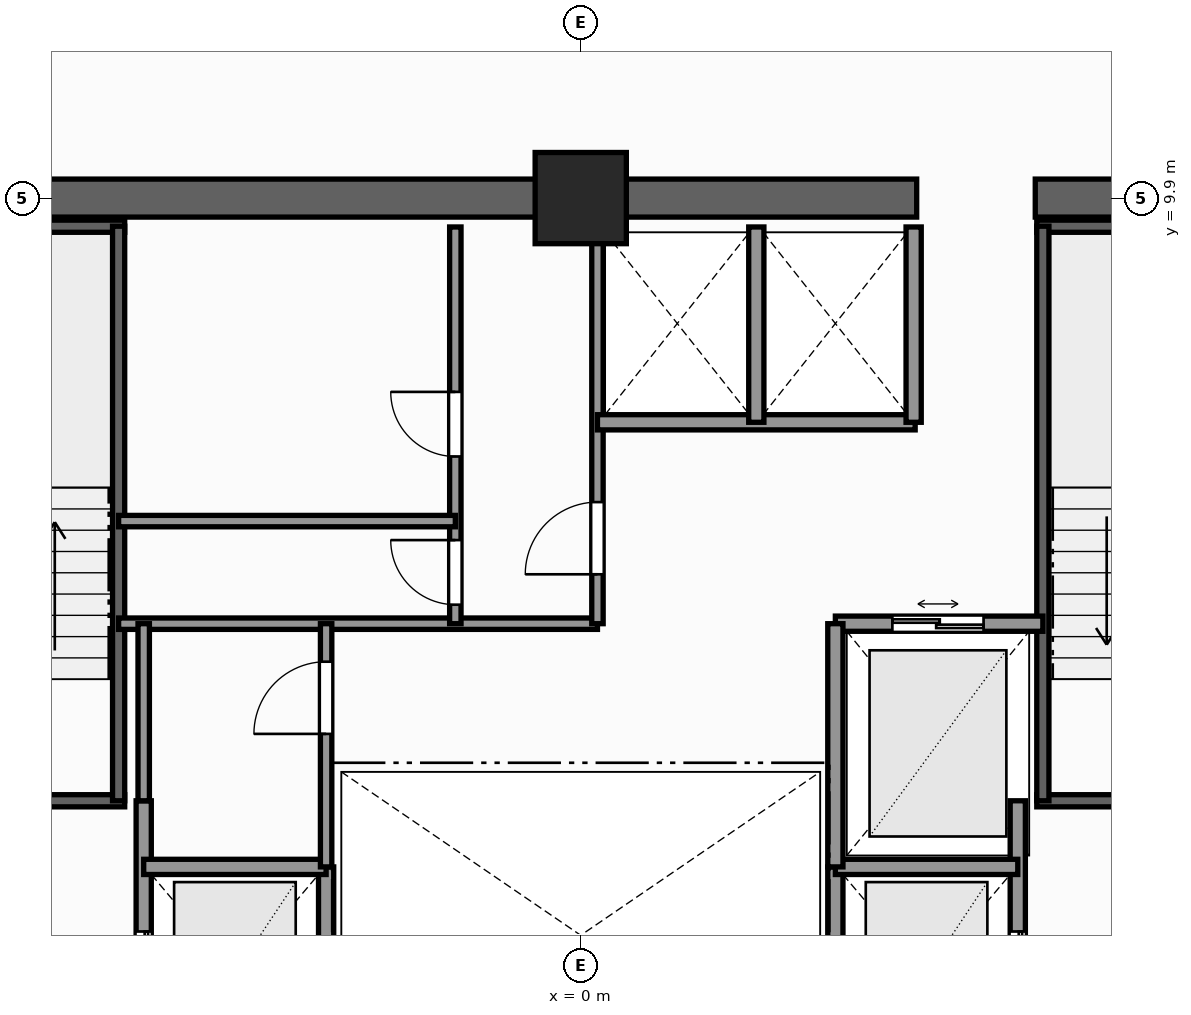
"""IFC4 building model, lengths in metres.
Left out: names, types, materials, properties, quantities, classifications, styles, units other than length and angle.
Written with IfcOpenShell. Run it as: python <this file> out.ifc"""

import sys

from ifc_helpers import new_model, si_unit, direction, frame, frame_2d, origin, origin_2d, place, context, subcontext, project, spatial, rectangle, extrude, element, fill, save


model = new_model("IFC4")
c1 = context("Model", 3, precision=1e-05, world=origin(), true_north=direction((0.0, 1.0)))
c2 = subcontext(c1, "Body", "Model", "MODEL_VIEW")
j1 = project(units=[si_unit("LENGTHUNIT", "METRE"), si_unit("PLANEANGLEUNIT", "RADIAN")], contexts=[c1])
p1 = place(None, origin())
s1 = spatial("IfcSite", under=j1, at=p1, CompositionType="ELEMENT")
p2 = place(p1, origin())
s2 = spatial("IfcBuilding", under=s1, at=p2, CompositionType="ELEMENT")
p3 = place(p2, frame((0.0, 0.0, 138.2)))
s3 = spatial("IfcBuildingStorey", under=s2, at=p3, CompositionType="ELEMENT", Elevation=138.2)
p4 = place(p3, frame((-10.15, 9.9, 0.0), z_axis=(0.0, 0.0, 1.0), x_axis=(1.0, 0.0, 0.0)))
e1 = element("IfcWall", 1, at=p4, inside=s3, PredefinedType="SHEAR", context=c2, shape_type="SweptSolid", body=[
    extrude(rectangle(XDim=14.57, YDim=0.5, at=frame_2d((7.285, 0.0))), origin(), (0.0, 0.0, 1.0), 3.3),
])
p5 = place(p3, frame((5.98, 9.9, 0.0), z_axis=(0.0, 0.0, 1.0), x_axis=(1.0, 0.0, 0.0)))
e2 = element("IfcWall", 2, at=p5, inside=s3, PredefinedType="SHEAR", context=c2, shape_type="SweptSolid", body=[
    extrude(rectangle(XDim=4.17, YDim=0.5, at=frame_2d((2.085, 0.0))), origin(), (0.0, 0.0, 1.0), 3.3),
])
p6 = place(p3, frame((0.0, 9.9, 0.0), z_axis=(0.0, 0.0, 1.0), x_axis=(1.0, 0.0, 0.0)))
e3 = element("IfcColumn", 3, at=p6, inside=s3, PredefinedType="COLUMN", context=c2, shape_type="SweptSolid", body=[
    extrude(rectangle(XDim=1.2, YDim=1.2, at=origin_2d()), origin(), (0.0, 0.0, 1.0), 3.3),
])
p7 = place(p3, frame((-9.52, 1.97, 0.0), z_axis=(0.0, 0.0, 1.0), x_axis=(1.0, 0.0, 0.0)))
e4 = element("IfcWall", 4, at=p7, inside=s3, PredefinedType="SHEAR", context=c2, shape_type="SweptSolid", body=[
    extrude(rectangle(XDim=3.52, YDim=0.16, at=frame_2d((1.76, 0.0))), origin(), (0.0, 0.0, 1.0), 3.3),
])
p8 = place(p7, frame((1.15, 0.0, 0.0)))
e5 = element("IfcOpeningElement", 5, at=p8, cuts=e4, PredefinedType="OPENING", context=c2, shape_type="SweptSolid", body=[
    extrude(rectangle(XDim=1.1, YDim=2.2, at=frame_2d((0.55, 1.1))), frame((0.0, 0.09, 0.0), z_axis=(0.0, -1.0, 0.0), x_axis=(1.0, 0.0, 0.0)), (0.0, 0.0, 1.0), 0.18),
])
p9 = place(p3, frame((-9.52, 9.53, 0.0), z_axis=(0.0, 0.0, 1.0), x_axis=(1.0, 0.0, 0.0)))
e6 = element("IfcWall", 6, at=p9, inside=s3, PredefinedType="SHEAR", context=c2, shape_type="SweptSolid", body=[
    extrude(rectangle(XDim=3.52, YDim=0.16, at=frame_2d((1.76, 0.0))), origin(), (0.0, 0.0, 1.0), 3.3),
])
p10 = place(p3, frame((-6.08, 1.97, 0.0), z_axis=(0.0, 0.0, 1.0), x_axis=(0.0, 1.0, 0.0)))
e7 = element("IfcWall", 7, at=p10, inside=s3, PredefinedType="SHEAR", context=c2, shape_type="SweptSolid", body=[
    extrude(rectangle(XDim=7.56, YDim=0.16, at=frame_2d((3.78, 0.0))), origin(), (0.0, 0.0, 1.0), 3.3),
])
p11 = place(p3, frame((6.0, 1.97, 0.0), z_axis=(0.0, 0.0, 1.0), x_axis=(1.0, 0.0, 0.0)))
e8 = element("IfcWall", 8, at=p11, inside=s3, PredefinedType="SHEAR", context=c2, shape_type="SweptSolid", body=[
    extrude(rectangle(XDim=3.52, YDim=0.16, at=frame_2d((1.76, 0.0))), origin(), (0.0, 0.0, 1.0), 3.3),
])
p12 = place(p11, frame((1.15, 0.0, 0.0)))
e9 = element("IfcOpeningElement", 9, at=p12, cuts=e8, PredefinedType="OPENING", context=c2, shape_type="SweptSolid", body=[
    extrude(rectangle(XDim=1.1, YDim=2.2, at=frame_2d((0.55, 1.1))), frame((0.0, 0.09, 0.0), z_axis=(0.0, -1.0, 0.0), x_axis=(1.0, 0.0, 0.0)), (0.0, 0.0, 1.0), 0.18),
])
p13 = place(p3, frame((6.0, 9.53, 0.0), z_axis=(0.0, 0.0, 1.0), x_axis=(1.0, 0.0, 0.0)))
e10 = element("IfcWall", 10, at=p13, inside=s3, PredefinedType="SHEAR", context=c2, shape_type="SweptSolid", body=[
    extrude(rectangle(XDim=3.52, YDim=0.16, at=frame_2d((1.76, 0.0))), origin(), (0.0, 0.0, 1.0), 3.3),
])
p14 = place(p3, frame((6.08, 1.97, 0.0), z_axis=(0.0, 0.0, 1.0), x_axis=(0.0, 1.0, 0.0)))
e11 = element("IfcWall", 11, at=p14, inside=s3, PredefinedType="SHEAR", context=c2, shape_type="SweptSolid", body=[
    extrude(rectangle(XDim=7.56, YDim=0.16, at=frame_2d((3.78, 0.0))), origin(), (0.0, 0.0, 1.0), 3.3),
])
p15 = place(p3, frame((-5.75, -3.6, 0.0), z_axis=(0.0, 0.0, 1.0), x_axis=(0.0, 1.0, 0.0)))
e12 = element("IfcWall", 12, at=p15, inside=s3, PredefinedType="SOLIDWALL", context=c2, shape_type="SweptSolid", body=[
    extrude(rectangle(XDim=5.57, YDim=0.2, at=frame_2d((2.785, 0.0))), origin(), (0.0, 0.0, 1.0), 2.735),
])
p16 = place(p15, frame((2.75, 0.0, 0.0)))
e13 = element("IfcOpeningElement", 13, at=p16, cuts=e12, PredefinedType="OPENING", context=c2, shape_type="SweptSolid", body=[
    extrude(rectangle(XDim=1.1, YDim=2.2, at=frame_2d((0.55, 1.1))), frame((0.0, 0.11, 0.0), z_axis=(0.0, -1.0, 0.0), x_axis=(1.0, 0.0, 0.0)), (0.0, 0.0, 1.0), 0.22),
])
p17 = place(p3, frame((-3.35, -1.7, 0.0), z_axis=(0.0, 0.0, 1.0), x_axis=(0.0, 1.0, 0.0)))
e14 = element("IfcWall", 14, at=p17, inside=s3, PredefinedType="SOLIDWALL", context=c2, shape_type="SweptSolid", body=[
    extrude(rectangle(XDim=2.8, YDim=0.2, at=frame_2d((1.4, 0.0))), origin(), (0.0, 0.0, 1.0), 2.735),
])
p18 = place(p3, frame((-5.75, 1.1, 0.0), z_axis=(0.0, 0.0, 1.0), x_axis=(1.0, 0.0, 0.0)))
e15 = element("IfcWall", 15, at=p18, inside=s3, PredefinedType="SOLIDWALL", context=c2, shape_type="SweptSolid", body=[
    extrude(rectangle(XDim=2.4, YDim=0.2, at=frame_2d((1.2, 0.0))), origin(), (0.0, 0.0, 1.0), 3.1),
])
p19 = place(p3, frame((5.75, -3.6, 0.0), z_axis=(0.0, 0.0, 1.0), x_axis=(0.0, 1.0, 0.0)))
e16 = element("IfcWall", 16, at=p19, inside=s3, PredefinedType="SOLIDWALL", context=c2, shape_type="SweptSolid", body=[
    extrude(rectangle(XDim=5.57, YDim=0.2, at=frame_2d((2.785, 0.0))), origin(), (0.0, 0.0, 1.0), 2.735),
])
p20 = place(p19, frame((2.75, 0.0, 0.0)))
e17 = element("IfcOpeningElement", 17, at=p20, cuts=e16, PredefinedType="OPENING", context=c2, shape_type="SweptSolid", body=[
    extrude(rectangle(XDim=1.1, YDim=2.2, at=frame_2d((0.55, 1.1))), frame((0.0, 0.11, 0.0), z_axis=(0.0, -1.0, 0.0), x_axis=(1.0, 0.0, 0.0)), (0.0, 0.0, 1.0), 0.22),
])
p21 = place(p3, frame((3.35, -1.7, 0.0), z_axis=(0.0, 0.0, 1.0), x_axis=(0.0, 1.0, 0.0)))
e18 = element("IfcWall", 18, at=p21, inside=s3, PredefinedType="SOLIDWALL", context=c2, shape_type="SweptSolid", body=[
    extrude(rectangle(XDim=2.8, YDim=0.2, at=frame_2d((1.4, 0.0))), origin(), (0.0, 0.0, 1.0), 2.735),
])
p22 = place(p3, frame((3.35, 1.1, 0.0), z_axis=(0.0, 0.0, 1.0), x_axis=(1.0, 0.0, 0.0)))
e19 = element("IfcWall", 19, at=p22, inside=s3, PredefinedType="SOLIDWALL", context=c2, shape_type="SweptSolid", body=[
    extrude(rectangle(XDim=2.4, YDim=0.2, at=frame_2d((1.2, 0.0))), origin(), (0.0, 0.0, 1.0), 3.1),
])
p23 = place(p3, frame((3.35, 4.3, 0.0), z_axis=(0.0, 0.0, 1.0), x_axis=(1.0, 0.0, 0.0)))
e20 = element("IfcWall", 20, at=p23, inside=s3, PredefinedType="SOLIDWALL", context=c2, shape_type="SweptSolid", body=[
    extrude(rectangle(XDim=2.73, YDim=0.2, at=frame_2d((1.365, 0.0))), origin(), (0.0, 0.0, 1.0), 3.1),
])
p24 = place(p23, frame((0.75, 0.0, 0.0)))
e21 = element("IfcOpeningElement", 21, at=p24, cuts=e20, PredefinedType="OPENING", context=c2, shape_type="SweptSolid", body=[
    extrude(rectangle(XDim=1.2, YDim=2.25, at=frame_2d((0.6, 1.125))), frame((0.0, 0.11, 0.0), z_axis=(0.0, -1.0, 0.0), x_axis=(1.0, 0.0, 0.0)), (0.0, 0.0, 1.0), 0.22),
])
p25 = place(p3, frame((3.35, 1.1, 0.0), z_axis=(0.0, 0.0, 1.0), x_axis=(0.0, 1.0, 0.0)))
e22 = element("IfcWall", 22, at=p25, inside=s3, PredefinedType="SOLIDWALL", context=c2, shape_type="SweptSolid", body=[
    extrude(rectangle(XDim=3.2, YDim=0.2, at=frame_2d((1.6, 0.0))), origin(), (0.0, 0.0, 1.0), 2.735),
])
p26 = place(p3, frame((-6.08, 4.3, 0.0), z_axis=(0.0, 0.0, 1.0), x_axis=(1.0, 0.0, 0.0)))
e23 = element("IfcWall", 23, at=p26, inside=s3, PredefinedType="PARTITIONING", context=c2, shape_type="SweptSolid", body=[
    extrude(rectangle(XDim=6.3, YDim=0.15, at=frame_2d((3.15, 0.0))), origin(), (0.0, 0.0, 1.0), 3.1),
])
p27 = place(p3, frame((0.22, 4.3, 0.0), z_axis=(0.0, 0.0, 1.0), x_axis=(0.0, 1.0, 0.0)))
e24 = element("IfcWall", 24, at=p27, inside=s3, PredefinedType="PARTITIONING", context=c2, shape_type="SweptSolid", body=[
    extrude(rectangle(XDim=5.22, YDim=0.15, at=frame_2d((2.61, 0.0))), origin(), (0.0, 0.0, 1.0), 3.1),
])
p28 = place(p27, frame((0.65, 0.0, 0.0)))
e25 = element("IfcOpeningElement", 25, at=p28, cuts=e24, PredefinedType="OPENING", context=c2, shape_type="SweptSolid", body=[
    extrude(rectangle(XDim=0.95, YDim=2.06, at=frame_2d((0.475, 1.03))), frame((0.0, 0.085, 0.0), z_axis=(0.0, -1.0, 0.0), x_axis=(1.0, 0.0, 0.0)), (0.0, 0.0, 1.0), 0.17),
])
p29 = place(p3, frame((-1.65, 4.3, 0.0), z_axis=(0.0, 0.0, 1.0), x_axis=(0.0, 1.0, 0.0)))
e26 = element("IfcWall", 26, at=p29, inside=s3, PredefinedType="PARTITIONING", context=c2, shape_type="SweptSolid", body=[
    extrude(rectangle(XDim=5.22, YDim=0.15, at=frame_2d((2.61, 0.0))), origin(), (0.0, 0.0, 1.0), 3.1),
])
p30 = place(p29, frame((2.2, 0.0, 0.0)))
e27 = element("IfcOpeningElement", 27, at=p30, cuts=e26, PredefinedType="OPENING", context=c2, shape_type="SweptSolid", body=[
    extrude(rectangle(XDim=0.85, YDim=2.03, at=frame_2d((0.425, 1.015))), frame((0.0, 0.085, 0.0), z_axis=(0.0, -1.0, 0.0), x_axis=(1.0, 0.0, 0.0)), (0.0, 0.0, 1.0), 0.17),
])
p31 = place(p29, frame((0.25, 0.0, 0.0)))
e28 = element("IfcOpeningElement", 28, at=p31, cuts=e26, PredefinedType="OPENING", context=c2, shape_type="SweptSolid", body=[
    extrude(rectangle(XDim=0.85, YDim=2.03, at=frame_2d((0.425, 1.015))), frame((0.0, 0.085, 0.0), z_axis=(0.0, -1.0, 0.0), x_axis=(1.0, 0.0, 0.0)), (0.0, 0.0, 1.0), 0.17),
])
p32 = place(p3, frame((-6.08, 5.65, 0.0), z_axis=(0.0, 0.0, 1.0), x_axis=(1.0, 0.0, 0.0)))
e29 = element("IfcWall", 29, at=p32, inside=s3, PredefinedType="PARTITIONING", context=c2, shape_type="SweptSolid", body=[
    extrude(rectangle(XDim=4.43, YDim=0.15, at=frame_2d((2.215, 0.0))), origin(), (0.0, 0.0, 1.0), 3.1),
])
p33 = place(p3, frame((0.22, 6.95, 0.0), z_axis=(0.0, 0.0, 1.0), x_axis=(1.0, 0.0, 0.0)))
e30 = element("IfcWall", 30, at=p33, inside=s3, PredefinedType="SOLIDWALL", context=c2, shape_type="SweptSolid", body=[
    extrude(rectangle(XDim=4.18, YDim=0.2, at=frame_2d((2.09, 0.0))), origin(), (0.0, 0.0, 1.0), 3.1),
])
for number, where, z_axis, x_axis in (
    (31, (4.38, 6.95, 0.0), (0.0, 0.0, 1.0), (0.0, 1.0, 0.0)),
    (32, (2.31, 6.95, 0.0), (0.0, 0.0, 1.0), (0.0, 1.0, 0.0)),
):
    element("IfcWall", number, at=place(p3, frame(where, z_axis=z_axis, x_axis=x_axis)), inside=s3, PredefinedType="SOLIDWALL", context=c2, shape_type="SweptSolid", body=[
        extrude(rectangle(XDim=2.57, YDim=0.2, at=frame_2d((1.285, 0.0))), origin(), (0.0, 0.0, 1.0), 3.1),
    ])
p34 = place(p3, frame((-3.35, 1.1, 0.0), z_axis=(0.0, 0.0, 1.0), x_axis=(0.0, 1.0, 0.0)))
e33 = element("IfcWall", 33, at=p34, inside=s3, PredefinedType="PARTITIONING", context=c2, shape_type="SweptSolid", body=[
    extrude(rectangle(XDim=3.2, YDim=0.15, at=frame_2d((1.6, 0.0))), origin(), (0.0, 0.0, 1.0), 2.735),
])
p35 = place(p34, frame((1.75, 0.0, 0.0)))
e34 = element("IfcOpeningElement", 34, at=p35, cuts=e33, PredefinedType="OPENING", context=c2, shape_type="SweptSolid", body=[
    extrude(rectangle(XDim=0.95, YDim=2.06, at=frame_2d((0.475, 1.03))), frame((0.0, 0.085, 0.0), z_axis=(0.0, -1.0, 0.0), x_axis=(1.0, 0.0, 0.0)), (0.0, 0.0, 1.0), 0.17),
])
p36 = place(p3, frame((-5.75, 1.97, 0.0), z_axis=(0.0, 0.0, 1.0), x_axis=(0.0, 1.0, 0.0)))
e35 = element("IfcWall", 35, at=p36, inside=s3, PredefinedType="PARTITIONING", context=c2, shape_type="SweptSolid", body=[
    extrude(rectangle(XDim=2.33, YDim=0.15, at=frame_2d((1.165, 0.0))), origin(), (0.0, 0.0, 1.0), 2.735),
])
p37 = place(p16, origin())
e36 = element("IfcDoor", 36, at=p37, inside=s3, OperationType="DOUBLE_DOOR_SLIDING", PredefinedType="DOOR", context=c2, shape_type="SweptSolid", body=[
    extrude(rectangle(XDim=1.1, YDim=2.2, at=frame_2d((0.55, 1.1))), frame((0.0, 0.025, 0.0), z_axis=(0.0, -1.0, 0.0), x_axis=(1.0, 0.0, 0.0)), (0.0, 0.0, 1.0), 0.05),
])
fill(e13, e36)
p38 = place(p20, origin())
e37 = element("IfcDoor", 37, at=p38, inside=s3, OperationType="DOUBLE_DOOR_SLIDING", PredefinedType="DOOR", context=c2, shape_type="SweptSolid", body=[
    extrude(rectangle(XDim=1.1, YDim=2.2, at=frame_2d((0.55, 1.1))), frame((0.0, 0.025, 0.0), z_axis=(0.0, -1.0, 0.0), x_axis=(1.0, 0.0, 0.0)), (0.0, 0.0, 1.0), 0.05),
])
fill(e17, e37)
p39 = place(p24, origin())
e38 = element("IfcDoor", 38, at=p39, inside=s3, OperationType="DOUBLE_DOOR_SLIDING", PredefinedType="DOOR", context=c2, shape_type="SweptSolid", body=[
    extrude(rectangle(XDim=1.2, YDim=2.25, at=frame_2d((0.6, 1.125))), frame((0.0, 0.025, 0.0), z_axis=(0.0, -1.0, 0.0), x_axis=(1.0, 0.0, 0.0)), (0.0, 0.0, 1.0), 0.05),
])
fill(e21, e38)
p40 = place(p28, origin())
e39 = element("IfcDoor", 39, at=p40, inside=s3, OperationType="SINGLE_SWING_LEFT", PredefinedType="DOOR", context=c2, shape_type="SweptSolid", body=[
    extrude(rectangle(XDim=0.95, YDim=2.06, at=frame_2d((0.475, 1.03))), frame((0.0, 0.025, 0.0), z_axis=(0.0, -1.0, 0.0), x_axis=(1.0, 0.0, 0.0)), (0.0, 0.0, 1.0), 0.05),
])
fill(e25, e39)
p41 = place(p30, origin())
e40 = element("IfcDoor", 40, at=p41, inside=s3, OperationType="SINGLE_SWING_RIGHT", PredefinedType="DOOR", context=c2, shape_type="SweptSolid", body=[
    extrude(rectangle(XDim=0.85, YDim=2.03, at=frame_2d((0.425, 1.015))), frame((0.0, 0.025, 0.0), z_axis=(0.0, -1.0, 0.0), x_axis=(1.0, 0.0, 0.0)), (0.0, 0.0, 1.0), 0.05),
])
fill(e27, e40)
p42 = place(p31, origin())
e41 = element("IfcDoor", 41, at=p42, inside=s3, OperationType="SINGLE_SWING_RIGHT", PredefinedType="DOOR", context=c2, shape_type="SweptSolid", body=[
    extrude(rectangle(XDim=0.85, YDim=2.03, at=frame_2d((0.425, 1.015))), frame((0.0, 0.025, 0.0), z_axis=(0.0, -1.0, 0.0), x_axis=(1.0, 0.0, 0.0)), (0.0, 0.0, 1.0), 0.05),
])
fill(e28, e41)
p43 = place(p35, origin())
e42 = element("IfcDoor", 42, at=p43, inside=s3, OperationType="SINGLE_SWING_LEFT", PredefinedType="DOOR", context=c2, shape_type="SweptSolid", body=[
    extrude(rectangle(XDim=0.95, YDim=2.06, at=frame_2d((0.475, 1.03))), frame((0.0, 0.025, 0.0), z_axis=(0.0, -1.0, 0.0), x_axis=(1.0, 0.0, 0.0)), (0.0, 0.0, 1.0), 0.05),
])
fill(e34, e42)
save(model, sys.argv[1])
